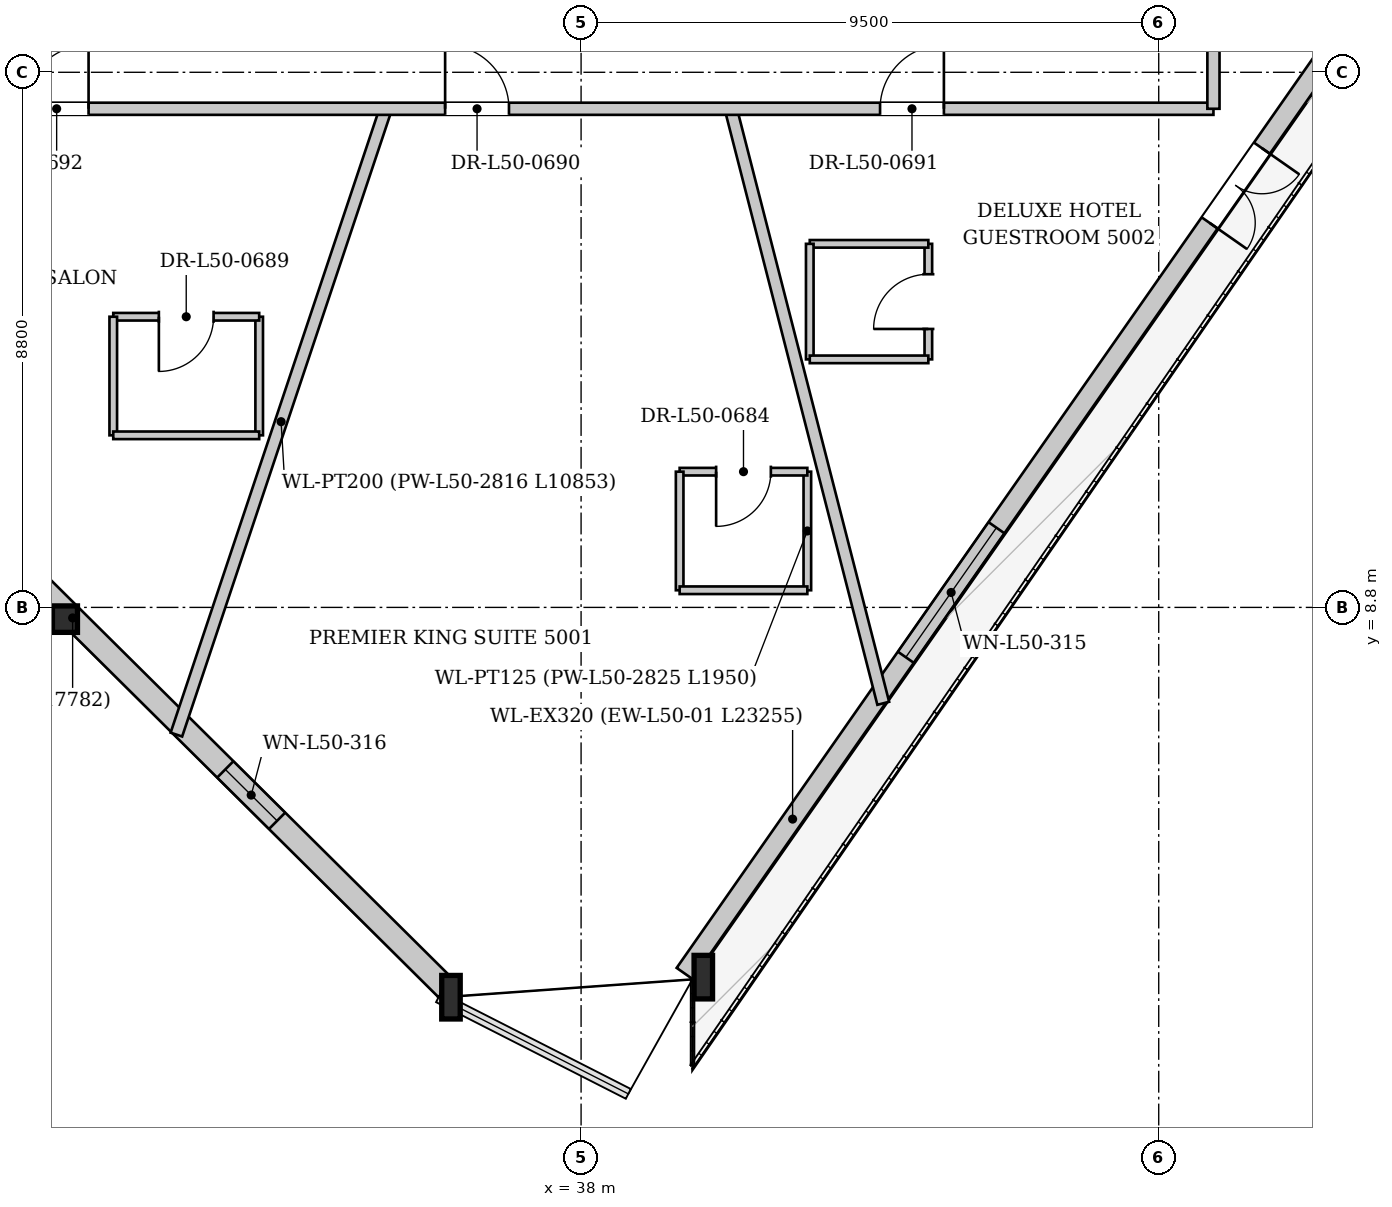
"""IFC4 building model, lengths in metres.
Left out: names, types, materials, properties, quantities, classifications, styles, units other than length and angle.
Written with IfcOpenShell. Run it as: python <this file> out.ifc"""

import sys

from ifc_helpers import new_model, si_unit, direction, frame, frame_2d, origin, origin_2d, place, context, subcontext, project, spatial, rectangle, i_section, extrude, source, transform, mapped, element, fill, save


model = new_model("IFC4")
c1 = context("Model", 3, precision=1e-05, world=origin(), true_north=direction((0.0, 1.0)))
c2 = subcontext(c1, "Body", "Model", "MODEL_VIEW")
j1 = project(units=[si_unit("LENGTHUNIT", "METRE"), si_unit("PLANEANGLEUNIT", "RADIAN")], contexts=[c1])
p1 = place(None, origin())
s1 = spatial("IfcSite", under=j1, at=p1, CompositionType="ELEMENT")
p2 = place(p1, origin())
s2 = spatial("IfcBuilding", under=s1, at=p2, CompositionType="ELEMENT")
p3 = place(p2, frame((0.0, 0.0, 189.2)))
s3 = spatial("IfcBuildingStorey", under=s2, at=p3, CompositionType="ELEMENT", Elevation=189.2)
m1 = source(origin(), c2, "Body", "SweptSolid", [
    extrude(i_section(OverallWidth=0.412, OverallDepth=0.435, WebThickness=0.031, FlangeThickness=0.05, at=origin_2d()), origin(), (0.0, 0.0, 1.0), 3.403),
])
p4 = place(p3, frame((29.344, 8.65, 0.0), z_axis=(0.098157072881, -0.025472047422, 0.994844894365), x_axis=(0.251183150489, 0.967939577097, 0.0)))
e1 = element("IfcColumn", 1, at=p4, inside=s3, PredefinedType="COLUMN", context=c2, shape_type="MappedRepresentation", body=[
    mapped(m1, transform((0.0, 0.0, 0.0), x_axis=(1.0, 0.0, 0.0), y_axis=(0.0, 1.0, 0.0), z_axis=(0.0, 0.0, 1.0), scale=1.0)),
])
m2 = source(origin(), c2, "Body", "SweptSolid", [
    extrude(i_section(OverallWidth=0.304, OverallDepth=0.716, WebThickness=0.021, FlangeThickness=0.04, at=origin_2d()), origin(), (0.0, 0.0, 1.0), 3.41),
])
p5 = place(p3, frame((35.656, 2.388, 0.0), z_axis=(0.119794586883, 0.000572837236, 0.992798533848), x_axis=(-0.00478177438, 0.999988567252, 0.0)))
e2 = element("IfcColumn", 2, at=p5, inside=s3, PredefinedType="COLUMN", context=c2, shape_type="MappedRepresentation", body=[
    mapped(m2, transform((0.0, 0.0, 0.0), x_axis=(1.0, 0.0, 0.0), y_axis=(0.0, 1.0, 0.0), z_axis=(0.0, 0.0, 1.0), scale=1.0)),
])
m3 = source(origin(), c2, "Body", "SweptSolid", [
    extrude(i_section(OverallWidth=0.304, OverallDepth=0.716, WebThickness=0.021, FlangeThickness=0.04, at=origin_2d()), origin(), (0.0, 0.0, 1.0), 3.404),
])
p6 = place(p3, frame((39.834, 2.688, 0.0), z_axis=(0.103498034536, 0.018576570301, 0.994456166899), x_axis=(-0.176664062794, 0.984271206994, 0.0)))
e3 = element("IfcColumn", 3, at=p6, inside=s3, PredefinedType="COLUMN", context=c2, shape_type="MappedRepresentation", body=[
    mapped(m3, transform((0.0, 0.0, 0.0), x_axis=(1.0, 0.0, 0.0), y_axis=(0.0, 1.0, 0.0), z_axis=(0.0, 0.0, 1.0), scale=1.0)),
])
p7 = place(p3, frame((53.032, 21.835, 0.0), z_axis=(0.0, 0.0, 1.0), x_axis=(-0.573201612269, -0.819414371178, 0.0)))
e4 = element("IfcWall", 4, at=p7, inside=s3, PredefinedType="SOLIDWALL", context=c2, shape_type="SweptSolid", body=[
    extrude(rectangle(XDim=23.255, YDim=0.32, at=frame_2d((11.627, 0.0))), origin(), (0.0, 0.0, 1.0), 2.722),
])
p8 = place(p7, frame((6.691, 0.0, 0.0)))
e5 = element("IfcOpeningElement", 5, at=p8, cuts=e4, PredefinedType="OPENING", context=c2, shape_type="SweptSolid", body=[
    extrude(rectangle(XDim=1.5, YDim=2.3, at=frame_2d((0.75, 1.15))), frame((0.0, 0.17, 0.0), z_axis=(0.0, -1.0, 0.0), x_axis=(1.0, 0.0, 0.0)), (0.0, 0.0, 1.0), 0.34),
])
p9 = place(p7, frame((14.308, 0.0, 0.252)))
e6 = element("IfcOpeningElement", 6, at=p9, cuts=e4, PredefinedType="OPENING", context=c2, shape_type="SweptSolid", body=[
    extrude(rectangle(XDim=2.6, YDim=2.35, at=frame_2d((1.3, 1.175))), frame((0.0, 0.17, 0.0), z_axis=(0.0, -1.0, 0.0), x_axis=(1.0, 0.0, 0.0)), (0.0, 0.0, 1.0), 0.34),
])
p10 = place(p7, frame((2.957, 0.0, 0.65)))
e7 = element("IfcOpeningElement", 7, at=p10, cuts=e4, PredefinedType="OPENING", context=c2, shape_type="SweptSolid", body=[
    extrude(rectangle(XDim=1.2, YDim=1.5, at=frame_2d((0.6, 0.75))), frame((0.0, 0.17, 0.0), z_axis=(0.0, -1.0, 0.0), x_axis=(1.0, 0.0, 0.0)), (0.0, 0.0, 1.0), 0.34),
])
p11 = place(p3, frame((35.79, 2.523, 0.0), z_axis=(0.0, 0.0, 1.0), x_axis=(-0.709902124229, 0.704300343614, 0.0)))
e8 = element("IfcWall", 8, at=p11, inside=s3, PredefinedType="SOLIDWALL", context=c2, shape_type="SweptSolid", body=[
    extrude(rectangle(XDim=17.782, YDim=0.38, at=frame_2d((8.891, 0.0))), origin(), (0.0, 0.0, 1.0), 2.722),
])
p12 = place(p11, frame((3.929, 0.0, 0.65)))
e9 = element("IfcOpeningElement", 9, at=p12, cuts=e8, PredefinedType="OPENING", context=c2, shape_type="SweptSolid", body=[
    extrude(rectangle(XDim=1.2, YDim=1.5, at=frame_2d((0.6, 0.75))), frame((0.0, 0.2, 0.0), z_axis=(0.0, -1.0, 0.0), x_axis=(1.0, 0.0, 0.0)), (0.0, 0.0, 1.0), 0.4),
])
p13 = place(p11, frame((12.203, 0.0, 0.65)))
e10 = element("IfcOpeningElement", 10, at=p13, cuts=e8, PredefinedType="OPENING", context=c2, shape_type="SweptSolid", body=[
    extrude(rectangle(XDim=1.2, YDim=1.5, at=frame_2d((0.6, 0.75))), frame((0.0, 0.2, 0.0), z_axis=(0.0, -1.0, 0.0), x_axis=(1.0, 0.0, 0.0)), (0.0, 0.0, 1.0), 0.4),
])
p14 = place(p3, frame((34.788, 17.0, 0.0), z_axis=(0.0, 0.0, 1.0), x_axis=(-0.317307373574, -0.94832274605, 0.0)))
e11 = element("IfcWall", 11, at=p14, inside=s3, PredefinedType="PARTITIONING", context=c2, shape_type="SweptSolid", body=[
    extrude(rectangle(XDim=10.853, YDim=0.2, at=frame_2d((5.426, 0.0))), origin(), (0.0, 0.0, 1.0), 3.33),
])
p15 = place(p3, frame((40.462, 17.0, 0.0), z_axis=(0.0, 0.0, 1.0), x_axis=(0.248410266706, -0.968654912441, 0.0)))
e12 = element("IfcWall", 12, at=p15, inside=s3, PredefinedType="PARTITIONING", context=c2, shape_type="SweptSolid", body=[
    extrude(rectangle(XDim=10.094, YDim=0.2, at=frame_2d((5.047, 0.0))), origin(), (0.0, 0.0, 1.0), 3.33),
])
p16 = place(p3, frame((41.721, 9.082, 0.0), z_axis=(0.0, 0.0, 1.0), x_axis=(0.0, 1.0, 0.0)))
e13 = element("IfcWall", 13, at=p16, inside=s3, PredefinedType="PARTITIONING", context=c2, shape_type="SweptSolid", body=[
    extrude(rectangle(XDim=1.95, YDim=0.125, at=frame_2d((0.975, 0.0))), origin(), (0.0, 0.0, 1.0), 3.33),
])
p17 = place(p3, frame((41.721, 11.032, 0.0), z_axis=(0.0, 0.0, 1.0), x_axis=(-1.0, 0.0, 0.0)))
e14 = element("IfcWall", 14, at=p17, inside=s3, PredefinedType="PARTITIONING", context=c2, shape_type="SweptSolid", body=[
    extrude(rectangle(XDim=2.1, YDim=0.125, at=frame_2d((1.05, 0.0))), origin(), (0.0, 0.0, 1.0), 3.33),
])
p18 = place(p17, frame((0.6, 0.0, 0.0)))
e15 = element("IfcOpeningElement", 15, at=p18, cuts=e14, PredefinedType="OPENING", context=c2, shape_type="SweptSolid", body=[
    extrude(rectangle(XDim=0.9, YDim=2.1, at=frame_2d((0.45, 1.05))), frame((0.0, 0.073, 0.0), z_axis=(0.0, -1.0, 0.0), x_axis=(1.0, 0.0, 0.0)), (0.0, 0.0, 1.0), 0.145),
])
p19 = place(p3, frame((39.621, 11.032, 0.0), z_axis=(0.0, 0.0, 1.0), x_axis=(0.0, -1.0, 0.0)))
e16 = element("IfcWall", 16, at=p19, inside=s3, PredefinedType="PARTITIONING", context=c2, shape_type="SweptSolid", body=[
    extrude(rectangle(XDim=1.95, YDim=0.125, at=frame_2d((0.975, 0.0))), origin(), (0.0, 0.0, 1.0), 3.33),
])
p20 = place(p3, frame((39.621, 9.082, 0.0), z_axis=(0.0, 0.0, 1.0), x_axis=(1.0, 0.0, 0.0)))
e17 = element("IfcWall", 17, at=p20, inside=s3, PredefinedType="PARTITIONING", context=c2, shape_type="SweptSolid", body=[
    extrude(rectangle(XDim=2.1, YDim=0.125, at=frame_2d((1.05, 0.0))), origin(), (0.0, 0.0, 1.0), 3.33),
])
p21 = place(p3, frame((43.711, 12.879, 0.0), z_axis=(0.0, 0.0, 1.0), x_axis=(0.0, 1.0, 0.0)))
e18 = element("IfcWall", 18, at=p21, inside=s3, PredefinedType="PARTITIONING", context=c2, shape_type="SweptSolid", body=[
    extrude(rectangle(XDim=1.9, YDim=0.125, at=frame_2d((0.95, 0.0))), origin(), (0.0, 0.0, 1.0), 3.33),
])
p22 = place(p21, frame((0.5, 0.0, 0.0)))
e19 = element("IfcOpeningElement", 19, at=p22, cuts=e18, PredefinedType="OPENING", context=c2, shape_type="SweptSolid", body=[
    extrude(rectangle(XDim=0.9, YDim=2.1, at=frame_2d((0.45, 1.05))), frame((0.0, 0.073, 0.0), z_axis=(0.0, -1.0, 0.0), x_axis=(1.0, 0.0, 0.0)), (0.0, 0.0, 1.0), 0.145),
])
p23 = place(p3, frame((43.711, 14.779, 0.0), z_axis=(0.0, 0.0, 1.0), x_axis=(-1.0, 0.0, 0.0)))
e20 = element("IfcWall", 20, at=p23, inside=s3, PredefinedType="PARTITIONING", context=c2, shape_type="SweptSolid", body=[
    extrude(rectangle(XDim=1.95, YDim=0.125, at=frame_2d((0.975, 0.0))), origin(), (0.0, 0.0, 1.0), 3.33),
])
p24 = place(p3, frame((41.761, 14.779, 0.0), z_axis=(0.0, 0.0, 1.0), x_axis=(0.0, -1.0, 0.0)))
e21 = element("IfcWall", 21, at=p24, inside=s3, PredefinedType="PARTITIONING", context=c2, shape_type="SweptSolid", body=[
    extrude(rectangle(XDim=1.9, YDim=0.125, at=frame_2d((0.95, 0.0))), origin(), (0.0, 0.0, 1.0), 3.33),
])
p25 = place(p3, frame((41.761, 12.879, 0.0), z_axis=(0.0, 0.0, 1.0), x_axis=(1.0, 0.0, 0.0)))
e22 = element("IfcWall", 22, at=p25, inside=s3, PredefinedType="PARTITIONING", context=c2, shape_type="SweptSolid", body=[
    extrude(rectangle(XDim=1.95, YDim=0.125, at=frame_2d((0.975, 0.0))), origin(), (0.0, 0.0, 1.0), 3.33),
])
p26 = place(p3, frame((32.706, 11.63, 0.0), z_axis=(0.0, 0.0, 1.0), x_axis=(0.0, 1.0, 0.0)))
e23 = element("IfcWall", 23, at=p26, inside=s3, PredefinedType="PARTITIONING", context=c2, shape_type="SweptSolid", body=[
    extrude(rectangle(XDim=1.95, YDim=0.125, at=frame_2d((0.975, 0.0))), origin(), (0.0, 0.0, 1.0), 3.33),
])
p27 = place(p3, frame((32.706, 13.58, 0.0), z_axis=(0.0, 0.0, 1.0), x_axis=(-1.0, 0.0, 0.0)))
e24 = element("IfcWall", 24, at=p27, inside=s3, PredefinedType="PARTITIONING", context=c2, shape_type="SweptSolid", body=[
    extrude(rectangle(XDim=2.4, YDim=0.125, at=frame_2d((1.2, 0.0))), origin(), (0.0, 0.0, 1.0), 3.33),
])
p28 = place(p27, frame((0.75, 0.0, 0.0)))
e25 = element("IfcOpeningElement", 25, at=p28, cuts=e24, PredefinedType="OPENING", context=c2, shape_type="SweptSolid", body=[
    extrude(rectangle(XDim=0.9, YDim=2.1, at=frame_2d((0.45, 1.05))), frame((0.0, 0.073, 0.0), z_axis=(0.0, -1.0, 0.0), x_axis=(1.0, 0.0, 0.0)), (0.0, 0.0, 1.0), 0.145),
])
p29 = place(p3, frame((30.306, 13.58, 0.0), z_axis=(0.0, 0.0, 1.0), x_axis=(0.0, -1.0, 0.0)))
e26 = element("IfcWall", 26, at=p29, inside=s3, PredefinedType="PARTITIONING", context=c2, shape_type="SweptSolid", body=[
    extrude(rectangle(XDim=1.95, YDim=0.125, at=frame_2d((0.975, 0.0))), origin(), (0.0, 0.0, 1.0), 3.33),
])
p30 = place(p3, frame((30.306, 11.63, 0.0), z_axis=(0.0, 0.0, 1.0), x_axis=(1.0, 0.0, 0.0)))
e27 = element("IfcWall", 27, at=p30, inside=s3, PredefinedType="PARTITIONING", context=c2, shape_type="SweptSolid", body=[
    extrude(rectangle(XDim=2.4, YDim=0.125, at=frame_2d((1.2, 0.0))), origin(), (0.0, 0.0, 1.0), 3.33),
])
p31 = place(p3, frame((27.6, 17.0, 0.0), z_axis=(0.0, 0.0, 1.0), x_axis=(1.0, 0.0, 0.0)))
e28 = element("IfcWall", 28, at=p31, inside=s3, PredefinedType="PARTITIONING", context=c2, shape_type="SweptSolid", body=[
    extrude(rectangle(XDim=20.8, YDim=0.2, at=frame_2d((10.4, 0.0))), origin(), (0.0, 0.0, 1.0), 3.33),
])
p32 = place(p31, frame((8.164, 0.0, 0.0)))
e29 = element("IfcOpeningElement", 29, at=p32, cuts=e28, PredefinedType="OPENING", context=c2, shape_type="SweptSolid", body=[
    extrude(rectangle(XDim=1.05, YDim=2.2, at=frame_2d((0.525, 1.1))), frame((0.0, 0.11, 0.0), z_axis=(0.0, -1.0, 0.0), x_axis=(1.0, 0.0, 0.0)), (0.0, 0.0, 1.0), 0.22),
])
p33 = place(p31, frame((15.317, 0.0, 0.0)))
e30 = element("IfcOpeningElement", 30, at=p33, cuts=e28, PredefinedType="OPENING", context=c2, shape_type="SweptSolid", body=[
    extrude(rectangle(XDim=1.05, YDim=2.2, at=frame_2d((0.525, 1.1))), frame((0.0, 0.11, 0.0), z_axis=(0.0, -1.0, 0.0), x_axis=(1.0, 0.0, 0.0)), (0.0, 0.0, 1.0), 0.22),
])
p34 = place(p31, frame((1.25, 0.0, 0.0)))
e31 = element("IfcOpeningElement", 31, at=p34, cuts=e28, PredefinedType="OPENING", context=c2, shape_type="SweptSolid", body=[
    extrude(rectangle(XDim=1.05, YDim=2.2, at=frame_2d((0.525, 1.1))), frame((0.0, 0.11, 0.0), z_axis=(0.0, -1.0, 0.0), x_axis=(1.0, 0.0, 0.0)), (0.0, 0.0, 1.0), 0.22),
])
p35 = place(p3, frame((48.4, 17.0, 0.0), z_axis=(0.0, 0.0, 1.0), x_axis=(0.0, 1.0, 0.0)))
e32 = element("IfcWall", 32, at=p35, inside=s3, PredefinedType="PARTITIONING", context=c2, shape_type="SweptSolid", body=[
    extrude(rectangle(XDim=19.2, YDim=0.2, at=frame_2d((9.6, 0.0))), origin(), (0.0, 0.0, 1.0), 3.33),
])
p36 = place(p35, frame((1.632, 0.0, 0.0)))
e33 = element("IfcOpeningElement", 33, at=p36, cuts=e32, PredefinedType="OPENING", context=c2, shape_type="SweptSolid", body=[
    extrude(rectangle(XDim=1.05, YDim=2.2, at=frame_2d((0.525, 1.1))), frame((0.0, 0.11, 0.0), z_axis=(0.0, -1.0, 0.0), x_axis=(1.0, 0.0, 0.0)), (0.0, 0.0, 1.0), 0.22),
])
p37 = place(p35, frame((9.686, 0.0, 0.0)))
e34 = element("IfcOpeningElement", 34, at=p37, cuts=e32, PredefinedType="OPENING", context=c2, shape_type="SweptSolid", body=[
    extrude(rectangle(XDim=1.05, YDim=2.2, at=frame_2d((0.525, 1.1))), frame((0.0, 0.11, 0.0), z_axis=(0.0, -1.0, 0.0), x_axis=(1.0, 0.0, 0.0)), (0.0, 0.0, 1.0), 0.22),
])
m4 = source(origin(), c2, "Body", "SweptSolid", [
    extrude(rectangle(XDim=1.5, YDim=2.3, at=frame_2d((0.75, 1.15))), frame((0.0, 0.025, 0.0), z_axis=(0.0, -1.0, 0.0), x_axis=(1.0, 0.0, 0.0)), (0.0, 0.0, 1.0), 0.05),
])
p38 = place(p8, origin())
e35 = element("IfcDoor", 35, at=p38, inside=s3, OperationType="DOUBLE_DOOR_SINGLE_SWING", PredefinedType="DOOR", context=c2, shape_type="MappedRepresentation", body=[
    mapped(m4, transform((0.0, 0.0, 0.0), x_axis=(1.0, 0.0, 0.0), y_axis=(0.0, 1.0, 0.0), z_axis=(0.0, 0.0, 1.0), scale=1.0)),
])
fill(e5, e35)
m5 = source(origin(), c2, "Body", "SweptSolid", [
    extrude(rectangle(XDim=2.6, YDim=2.35, at=frame_2d((1.3, 1.175))), frame((0.0, 0.03, 0.0), z_axis=(0.0, -1.0, 0.0), x_axis=(1.0, 0.0, 0.0)), (0.0, 0.0, 1.0), 0.06),
])
p39 = place(p9, origin())
e36 = element("IfcWindow", 36, at=p39, inside=s3, PartitioningType="SINGLE_PANEL", PredefinedType="WINDOW", context=c2, shape_type="MappedRepresentation", body=[
    mapped(m5, transform((0.0, 0.0, 0.0), x_axis=(1.0, 0.0, 0.0), y_axis=(0.0, 1.0, 0.0), z_axis=(0.0, 0.0, 1.0), scale=1.0)),
])
fill(e6, e36)
m6 = source(origin(), c2, "Body", "SweptSolid", [
    extrude(rectangle(XDim=1.2, YDim=1.5, at=frame_2d((0.6, 0.75))), frame((0.0, 0.03, 0.0), z_axis=(0.0, -1.0, 0.0), x_axis=(1.0, 0.0, 0.0)), (0.0, 0.0, 1.0), 0.06),
])
p40 = place(p12, origin())
e37 = element("IfcWindow", 37, at=p40, inside=s3, PartitioningType="SINGLE_PANEL", PredefinedType="WINDOW", context=c2, shape_type="MappedRepresentation", body=[
    mapped(m6, transform((0.0, 0.0, 0.0), x_axis=(1.0, 0.0, 0.0), y_axis=(0.0, 1.0, 0.0), z_axis=(0.0, 0.0, 1.0), scale=1.0)),
])
fill(e9, e37)
m7 = source(origin(), c2, "Body", "SweptSolid", [
    extrude(rectangle(XDim=0.9, YDim=2.1, at=frame_2d((0.45, 1.05))), frame((0.0, 0.025, 0.0), z_axis=(0.0, -1.0, 0.0), x_axis=(1.0, 0.0, 0.0)), (0.0, 0.0, 1.0), 0.05),
])
p41 = place(p18, origin())
e38 = element("IfcDoor", 38, at=p41, inside=s3, OperationType="SINGLE_SWING_RIGHT", PredefinedType="DOOR", context=c2, shape_type="MappedRepresentation", body=[
    mapped(m7, transform((0.0, 0.0, 0.0), x_axis=(1.0, 0.0, 0.0), y_axis=(0.0, 1.0, 0.0), z_axis=(0.0, 0.0, 1.0), scale=1.0)),
])
fill(e15, e38)
p42 = place(p22, origin())
e39 = element("IfcDoor", 39, at=p42, inside=s3, OperationType="SINGLE_SWING_LEFT", PredefinedType="DOOR", context=c2, shape_type="MappedRepresentation", body=[
    mapped(m7, transform((0.0, 0.0, 0.0), x_axis=(1.0, 0.0, 0.0), y_axis=(0.0, 1.0, 0.0), z_axis=(0.0, 0.0, 1.0), scale=1.0)),
])
fill(e19, e39)
p43 = place(p28, origin())
e40 = element("IfcDoor", 40, at=p43, inside=s3, OperationType="SINGLE_SWING_RIGHT", PredefinedType="DOOR", context=c2, shape_type="MappedRepresentation", body=[
    mapped(m7, transform((0.0, 0.0, 0.0), x_axis=(1.0, 0.0, 0.0), y_axis=(0.0, 1.0, 0.0), z_axis=(0.0, 0.0, 1.0), scale=1.0)),
])
fill(e25, e40)
m8 = source(origin(), c2, "Body", "SweptSolid", [
    extrude(rectangle(XDim=1.05, YDim=2.2, at=frame_2d((0.525, 1.1))), frame((0.0, 0.025, 0.0), z_axis=(0.0, -1.0, 0.0), x_axis=(1.0, 0.0, 0.0)), (0.0, 0.0, 1.0), 0.05),
])
p44 = place(p32, origin())
e41 = element("IfcDoor", 41, at=p44, inside=s3, OperationType="SINGLE_SWING_LEFT", PredefinedType="DOOR", context=c2, shape_type="MappedRepresentation", body=[
    mapped(m8, transform((0.0, 0.0, 0.0), x_axis=(1.0, 0.0, 0.0), y_axis=(0.0, 1.0, 0.0), z_axis=(0.0, 0.0, 1.0), scale=1.0)),
])
fill(e29, e41)
p45 = place(p33, origin())
e42 = element("IfcDoor", 42, at=p45, inside=s3, OperationType="SINGLE_SWING_RIGHT", PredefinedType="DOOR", context=c2, shape_type="MappedRepresentation", body=[
    mapped(m8, transform((0.0, 0.0, 0.0), x_axis=(1.0, 0.0, 0.0), y_axis=(0.0, 1.0, 0.0), z_axis=(0.0, 0.0, 1.0), scale=1.0)),
])
fill(e30, e42)
p46 = place(p34, origin())
e43 = element("IfcDoor", 43, at=p46, inside=s3, OperationType="SINGLE_SWING_RIGHT", PredefinedType="DOOR", context=c2, shape_type="MappedRepresentation", body=[
    mapped(m8, transform((0.0, 0.0, 0.0), x_axis=(1.0, 0.0, 0.0), y_axis=(0.0, 1.0, 0.0), z_axis=(0.0, 0.0, 1.0), scale=1.0)),
])
fill(e31, e43)
save(model, sys.argv[1])
